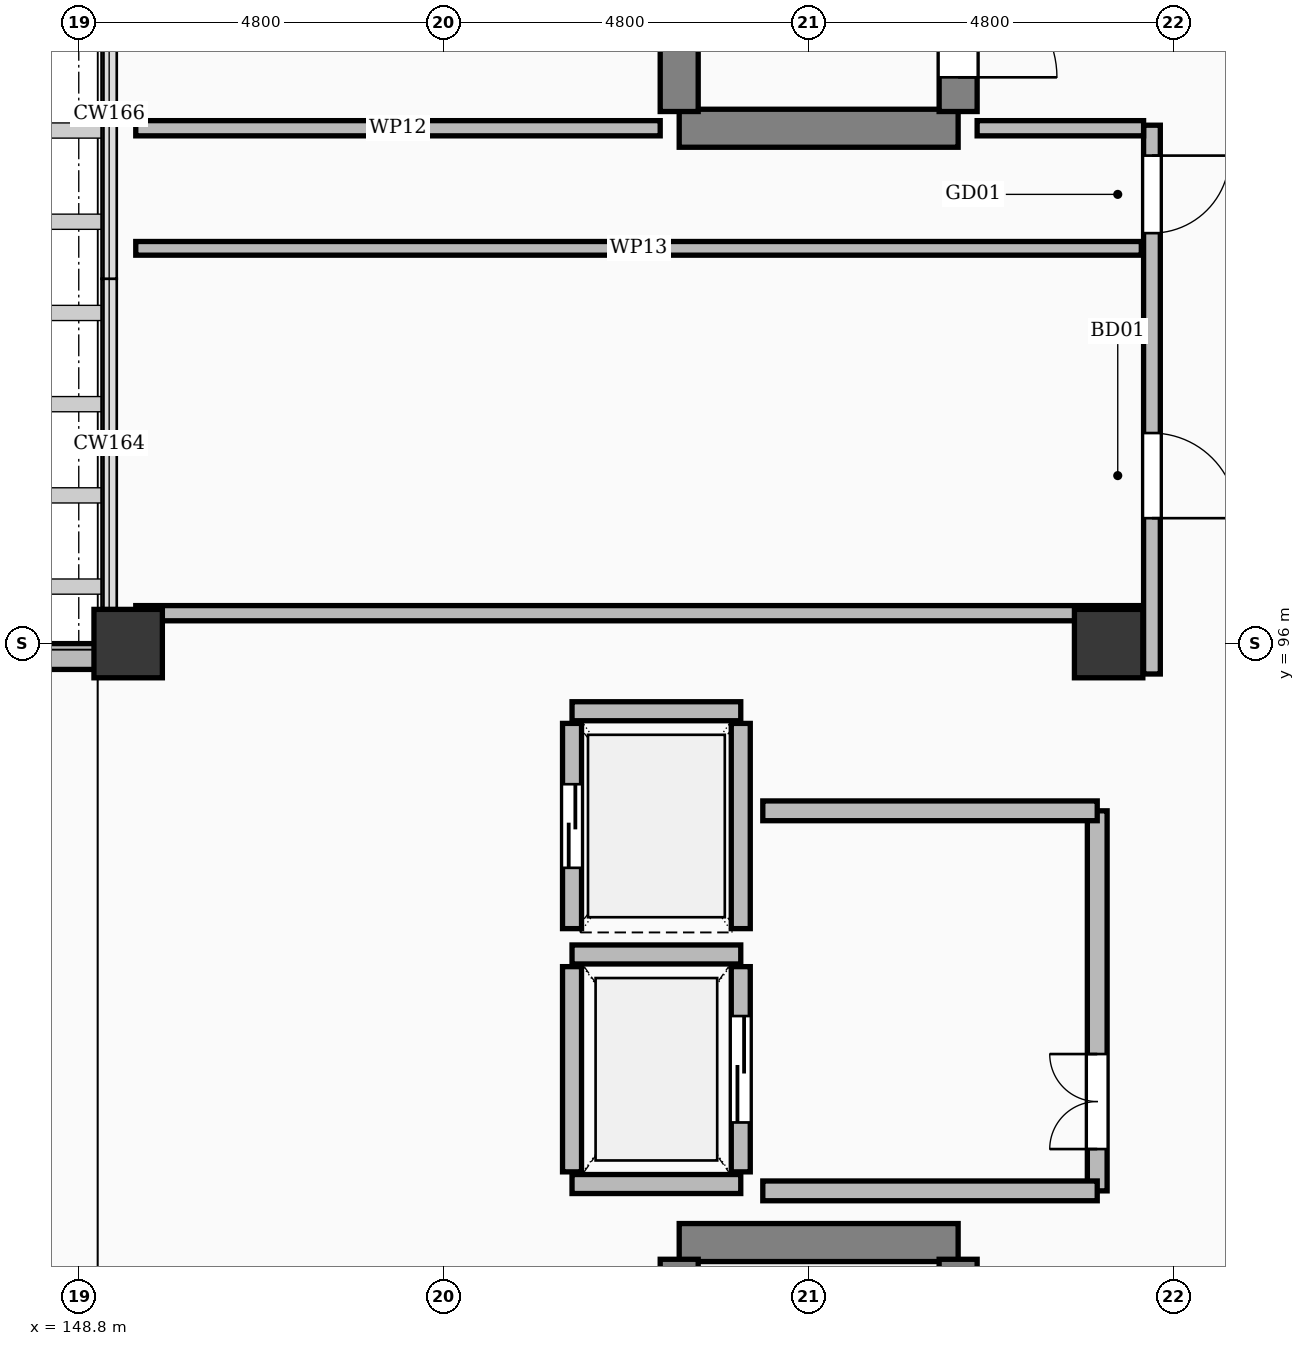
"""IFC4 building model, lengths in metres.
Left out: names, types, materials, properties, quantities, classifications, styles, units other than length and angle.
Written with IfcOpenShell. Run it as: python <this file> out.ifc"""

import sys

from ifc_helpers import new_model, si_unit, direction, frame, frame_2d, origin, origin_2d, place, context, subcontext, project, spatial, rectangle, extrude, element, fill, save


model = new_model("IFC4")
c1 = context("Model", 3, precision=1e-05, world=origin(), true_north=direction((0.0, 1.0)))
c2 = subcontext(c1, "Body", "Model", "MODEL_VIEW")
j1 = project(units=[si_unit("LENGTHUNIT", "METRE"), si_unit("PLANEANGLEUNIT", "RADIAN")], contexts=[c1])
p1 = place(None, origin())
s1 = spatial("IfcSite", under=j1, at=p1, CompositionType="ELEMENT")
p2 = place(p1, origin())
s2 = spatial("IfcBuilding", under=s1, at=p2, CompositionType="ELEMENT")
p3 = place(p2, frame((0.0, 0.0, 16.2)))
s3 = spatial("IfcBuildingStorey", under=s2, at=p3, CompositionType="ELEMENT", Elevation=16.2)
for number, where, z_axis, x_axis in (
    (1, (149.45, 96.0, 0.0), (0.0, 0.0, 1.0), (1.0, 0.0, 0.0)),
    (2, (162.35, 96.0, 0.0), (0.0, 0.0, 1.0), (1.0, 0.0, 0.0)),
):
    element("IfcColumn", number, at=place(p3, frame(where, z_axis=z_axis, x_axis=x_axis)), inside=s3, PredefinedType="COLUMN", context=c2, shape_type="SweptSolid", body=[
        extrude(rectangle(XDim=0.9, YDim=0.9, at=origin_2d()), origin(), (0.0, 0.0, 1.0), 4.8),
    ])
p4 = place(p3, frame((144.3, 95.83, 0.0), z_axis=(0.0, 0.0, 1.0), x_axis=(1.0, 0.0, 0.0)))
e3 = element("IfcWall", 3, at=p4, inside=s3, PredefinedType="SOLIDWALL", context=c2, shape_type="SweptSolid", body=[
    extrude(rectangle(XDim=4.725, YDim=0.34, at=frame_2d((2.362, 0.0))), origin(), (0.0, 0.0, 1.0), 3.032),
])
p5 = place(p3, frame((156.7, 88.12, 0.0), z_axis=(0.0, 0.0, 1.0), x_axis=(1.0, 0.0, 0.0)))
e4 = element("IfcWall", 4, at=p5, inside=s3, PredefinedType="SHEAR", context=c2, shape_type="SweptSolid", body=[
    extrude(rectangle(XDim=3.67, YDim=0.5, at=frame_2d((1.835, 0.0))), origin(), (0.0, 0.0, 1.0), 4.54),
])
p6 = place(p3, frame((156.7, 77.4, 0.0), z_axis=(0.0, 0.0, 1.0), x_axis=(0.0, 1.0, 0.0)))
e5 = element("IfcWall", 5, at=p6, inside=s3, PredefinedType="SHEAR", context=c2, shape_type="SweptSolid", body=[
    extrude(rectangle(XDim=10.5, YDim=0.5, at=frame_2d((5.25, 0.0))), origin(), (0.0, 0.0, 1.0), 4.54),
])
p7 = place(p3, frame((160.37, 77.4, 0.0), z_axis=(0.0, 0.0, 1.0), x_axis=(0.0, 1.0, 0.0)))
e6 = element("IfcWall", 6, at=p7, inside=s3, PredefinedType="SHEAR", context=c2, shape_type="SweptSolid", body=[
    extrude(rectangle(XDim=10.5, YDim=0.5, at=frame_2d((5.25, 0.0))), origin(), (0.0, 0.0, 1.0), 4.54),
])
p8 = place(p7, frame((0.45, 0.0, 0.0)))
e7 = element("IfcOpeningElement", 7, at=p8, cuts=e6, PredefinedType="OPENING", context=c2, shape_type="SweptSolid", body=[
    extrude(rectangle(XDim=1.3, YDim=2.15, at=frame_2d((0.65, 1.075))), frame((0.0, 0.262, 0.0), z_axis=(0.0, -1.0, 0.0), x_axis=(1.0, 0.0, 0.0)), (0.0, 0.0, 1.0), 0.524),
])
for number, where, z_axis, x_axis in (
    (8, (155.29, 88.89, 0.0), (0.0, 0.0, 1.0), (1.0, 0.0, 0.0)),
    (9, (155.29, 91.91, 0.0), (0.0, 0.0, 1.0), (1.0, 0.0, 0.0)),
):
    element("IfcWall", number, at=place(p3, frame(where, z_axis=z_axis, x_axis=x_axis)), inside=s3, PredefinedType="SOLIDWALL", context=c2, shape_type="SweptSolid", body=[
        extrude(rectangle(XDim=2.22, YDim=0.25, at=frame_2d((1.11, 0.0))), origin(), (0.0, 0.0, 1.0), 4.54),
    ])
p9 = place(p3, frame((155.29, 89.05, 0.0), z_axis=(0.0, 0.0, 1.0), x_axis=(0.0, 1.0, 0.0)))
e10 = element("IfcWall", 10, at=p9, inside=s3, PredefinedType="SOLIDWALL", context=c2, shape_type="SweptSolid", body=[
    extrude(rectangle(XDim=2.7, YDim=0.25, at=frame_2d((1.35, 0.0))), origin(), (0.0, 0.0, 1.0), 4.54),
])
p10 = place(p3, frame((157.51, 89.05, 0.0), z_axis=(0.0, 0.0, 1.0), x_axis=(0.0, 1.0, 0.0)))
e11 = element("IfcWall", 11, at=p10, inside=s3, PredefinedType="SOLIDWALL", context=c2, shape_type="SweptSolid", body=[
    extrude(rectangle(XDim=2.7, YDim=0.25, at=frame_2d((1.35, 0.0))), origin(), (0.0, 0.0, 1.0), 4.54),
])
p11 = place(p10, frame((0.65, 0.0, 0.0)))
e12 = element("IfcOpeningElement", 12, at=p11, cuts=e11, PredefinedType="OPENING", context=c2, shape_type="SweptSolid", body=[
    extrude(rectangle(XDim=1.4, YDim=2.3, at=frame_2d((0.7, 1.15))), frame((0.0, 0.137, 0.0), z_axis=(0.0, -1.0, 0.0), x_axis=(1.0, 0.0, 0.0)), (0.0, 0.0, 1.0), 0.274),
])
p12 = place(p3, frame((155.29, 95.11, 0.0), z_axis=(0.0, 0.0, 1.0), x_axis=(1.0, 0.0, 0.0)))
e13 = element("IfcWall", 13, at=p12, inside=s3, PredefinedType="SOLIDWALL", context=c2, shape_type="SweptSolid", body=[
    extrude(rectangle(XDim=2.22, YDim=0.25, at=frame_2d((1.11, 0.0))), origin(), (0.0, 0.0, 1.0), 4.54),
])
p13 = place(p3, frame((155.29, 92.25, 0.0), z_axis=(0.0, 0.0, 1.0), x_axis=(0.0, 1.0, 0.0)))
e14 = element("IfcWall", 14, at=p13, inside=s3, PredefinedType="SOLIDWALL", context=c2, shape_type="SweptSolid", body=[
    extrude(rectangle(XDim=2.7, YDim=0.25, at=frame_2d((1.35, 0.0))), origin(), (0.0, 0.0, 1.0), 4.54),
])
p14 = place(p13, frame((0.8, 0.0, 0.0)))
e15 = element("IfcOpeningElement", 15, at=p14, cuts=e14, PredefinedType="OPENING", context=c2, shape_type="SweptSolid", body=[
    extrude(rectangle(XDim=1.1, YDim=2.2, at=frame_2d((0.55, 1.1))), frame((0.0, 0.137, 0.0), z_axis=(0.0, -1.0, 0.0), x_axis=(1.0, 0.0, 0.0)), (0.0, 0.0, 1.0), 0.274),
])
p15 = place(p3, frame((157.51, 92.25, 0.0), z_axis=(0.0, 0.0, 1.0), x_axis=(0.0, 1.0, 0.0)))
e16 = element("IfcWall", 16, at=p15, inside=s3, PredefinedType="SOLIDWALL", context=c2, shape_type="SweptSolid", body=[
    extrude(rectangle(XDim=2.7, YDim=0.25, at=frame_2d((1.35, 0.0))), origin(), (0.0, 0.0, 1.0), 4.54),
])
p16 = place(p3, frame((162.2, 88.8, 0.0), z_axis=(0.0, 0.0, 1.0), x_axis=(0.0, 1.0, 0.0)))
e17 = element("IfcWall", 17, at=p16, inside=s3, PredefinedType="SOLIDWALL", context=c2, shape_type="SweptSolid", body=[
    extrude(rectangle(XDim=5.0, YDim=0.26, at=frame_2d((2.5, 0.0))), origin(), (0.0, 0.0, 1.0), 3.132),
])
p17 = place(p16, frame((0.55, 0.0, 0.0)))
e18 = element("IfcOpeningElement", 18, at=p17, cuts=e17, PredefinedType="OPENING", context=c2, shape_type="SweptSolid", body=[
    extrude(rectangle(XDim=1.25, YDim=2.15, at=frame_2d((0.625, 1.075))), frame((0.0, 0.142, 0.0), z_axis=(0.0, -1.0, 0.0), x_axis=(1.0, 0.0, 0.0)), (0.0, 0.0, 1.0), 0.284),
])
for number, where, z_axis, x_axis in (
    (19, (157.8, 88.8, 0.0), (0.0, 0.0, 1.0), (1.0, 0.0, 0.0)),
    (20, (157.8, 93.8, 0.0), (0.0, 0.0, 1.0), (1.0, 0.0, 0.0)),
):
    element("IfcWall", number, at=place(p3, frame(where, z_axis=z_axis, x_axis=x_axis)), inside=s3, PredefinedType="SOLIDWALL", context=c2, shape_type="SweptSolid", body=[
        extrude(rectangle(XDim=4.4, YDim=0.26, at=frame_2d((2.2, 0.0))), origin(), (0.0, 0.0, 1.0), 3.132),
    ])
p18 = place(p3, frame((156.7, 102.78, 0.0), z_axis=(0.0, 0.0, 1.0), x_axis=(1.0, 0.0, 0.0)))
e21 = element("IfcWall", 21, at=p18, inside=s3, PredefinedType="SHEAR", context=c2, shape_type="SweptSolid", body=[
    extrude(rectangle(XDim=3.67, YDim=0.5, at=frame_2d((1.835, 0.0))), origin(), (0.0, 0.0, 1.0), 4.54),
])
p19 = place(p3, frame((156.7, 103.0, 0.0), z_axis=(0.0, 0.0, 1.0), x_axis=(0.0, 1.0, 0.0)))
e22 = element("IfcWall", 22, at=p19, inside=s3, PredefinedType="SHEAR", context=c2, shape_type="SweptSolid", body=[
    extrude(rectangle(XDim=10.5, YDim=0.5, at=frame_2d((5.25, 0.0))), origin(), (0.0, 0.0, 1.0), 4.54),
])
p20 = place(p3, frame((160.37, 103.0, 0.0), z_axis=(0.0, 0.0, 1.0), x_axis=(0.0, 1.0, 0.0)))
e23 = element("IfcWall", 23, at=p20, inside=s3, PredefinedType="SHEAR", context=c2, shape_type="SweptSolid", body=[
    extrude(rectangle(XDim=10.5, YDim=0.5, at=frame_2d((5.25, 0.0))), origin(), (0.0, 0.0, 1.0), 4.54),
])
p21 = place(p20, frame((0.45, 0.0, 0.0)))
e24 = element("IfcOpeningElement", 24, at=p21, cuts=e23, PredefinedType="OPENING", context=c2, shape_type="SweptSolid", body=[
    extrude(rectangle(XDim=1.3, YDim=2.15, at=frame_2d((0.65, 1.075))), frame((0.0, 0.262, 0.0), z_axis=(0.0, -1.0, 0.0), x_axis=(1.0, 0.0, 0.0)), (0.0, 0.0, 1.0), 0.524),
])
p22 = place(p3, frame((162.92, 95.6, 0.0), z_axis=(0.0, 0.0, 1.0), x_axis=(0.0, 1.0, 0.0)))
e25 = element("IfcWall", 25, at=p22, inside=s3, PredefinedType="PARTITIONING", context=c2, shape_type="SweptSolid", body=[
    extrude(rectangle(XDim=7.22, YDim=0.22, at=frame_2d((3.61, 0.0))), origin(), (0.0, 0.0, 1.0), 3.732),
])
p23 = place(p22, frame((2.05, 0.0, 0.0)))
e26 = element("IfcOpeningElement", 26, at=p23, cuts=e25, PredefinedType="OPENING", context=c2, shape_type="SweptSolid", body=[
    extrude(rectangle(XDim=1.12, YDim=2.15, at=frame_2d((0.56, 1.075))), frame((0.0, 0.122, 0.0), z_axis=(0.0, -1.0, 0.0), x_axis=(1.0, 0.0, 0.0)), (0.0, 0.0, 1.0), 0.244),
])
p24 = place(p22, frame((5.8, 0.0, 0.0)))
e27 = element("IfcOpeningElement", 27, at=p24, cuts=e25, PredefinedType="OPENING", context=c2, shape_type="SweptSolid", body=[
    extrude(rectangle(XDim=1.02, YDim=2.2, at=frame_2d((0.51, 1.1))), frame((0.0, 0.122, 0.0), z_axis=(0.0, -1.0, 0.0), x_axis=(1.0, 0.0, 0.0)), (0.0, 0.0, 1.0), 0.244),
])
p25 = place(p3, frame((149.55, 96.4, 0.0), z_axis=(0.0, 0.0, 1.0), x_axis=(1.0, 0.0, 0.0)))
e28 = element("IfcWall", 28, at=p25, inside=s3, PredefinedType="PARTITIONING", context=c2, shape_type="SweptSolid", body=[
    extrude(rectangle(XDim=13.23, YDim=0.2, at=frame_2d((6.615, 0.0))), origin(), (0.0, 0.0, 1.0), 3.032),
])
p26 = place(p3, frame((149.55, 101.2, 0.0), z_axis=(0.0, 0.0, 1.0), x_axis=(1.0, 0.0, 0.0)))
e29 = element("IfcWall", 29, at=p26, inside=s3, PredefinedType="PARTITIONING", context=c2, shape_type="SweptSolid", body=[
    extrude(rectangle(XDim=13.23, YDim=0.18, at=frame_2d((6.615, 0.0))), origin(), (0.0, 0.0, 1.0), 3.032),
])
p27 = place(p3, frame((149.55, 102.78, 0.0), z_axis=(0.0, 0.0, 1.0), x_axis=(1.0, 0.0, 0.0)))
e30 = element("IfcWall", 30, at=p27, inside=s3, PredefinedType="PARTITIONING", context=c2, shape_type="SweptSolid", body=[
    extrude(rectangle(XDim=6.9, YDim=0.2, at=frame_2d((3.45, 0.0))), origin(), (0.0, 0.0, 1.0), 3.032),
])
p28 = place(p3, frame((160.62, 102.78, 0.0), z_axis=(0.0, 0.0, 1.0), x_axis=(1.0, 0.0, 0.0)))
e31 = element("IfcWall", 31, at=p28, inside=s3, PredefinedType="PARTITIONING", context=c2, shape_type="SweptSolid", body=[
    extrude(rectangle(XDim=2.19, YDim=0.2, at=frame_2d((1.095, 0.0))), origin(), (0.0, 0.0, 1.0), 3.132),
])
p29 = place(p11, origin())
e32 = element("IfcDoor", 32, at=p29, inside=s3, OperationType="SLIDING_TO_LEFT", PredefinedType="DOOR", context=c2, shape_type="SweptSolid", body=[
    extrude(rectangle(XDim=1.4, YDim=2.3, at=frame_2d((0.7, 1.15))), frame((0.0, 0.025, 0.0), z_axis=(0.0, -1.0, 0.0), x_axis=(1.0, 0.0, 0.0)), (0.0, 0.0, 1.0), 0.05),
])
fill(e12, e32)
p30 = place(p14, origin())
e33 = element("IfcDoor", 33, at=p30, inside=s3, OperationType="SLIDING_TO_LEFT", PredefinedType="DOOR", context=c2, shape_type="SweptSolid", body=[
    extrude(rectangle(XDim=1.1, YDim=2.2, at=frame_2d((0.55, 1.1))), frame((0.0, 0.025, 0.0), z_axis=(0.0, -1.0, 0.0), x_axis=(1.0, 0.0, 0.0)), (0.0, 0.0, 1.0), 0.05),
])
fill(e15, e33)
p31 = place(p17, origin())
e34 = element("IfcDoor", 34, at=p31, inside=s3, OperationType="DOUBLE_DOOR_SINGLE_SWING", PredefinedType="DOOR", context=c2, shape_type="SweptSolid", body=[
    extrude(rectangle(XDim=1.25, YDim=2.15, at=frame_2d((0.625, 1.075))), frame((0.0, 0.025, 0.0), z_axis=(0.0, -1.0, 0.0), x_axis=(1.0, 0.0, 0.0)), (0.0, 0.0, 1.0), 0.05),
])
fill(e18, e34)
p32 = place(p21, frame((1.3, 0.0, 0.0), z_axis=(0.0, 0.0, 1.0), x_axis=(-1.0, 0.0, 0.0)))
e35 = element("IfcDoor", 35, at=p32, inside=s3, OperationType="SINGLE_SWING_LEFT", PredefinedType="DOOR", context=c2, shape_type="SweptSolid", body=[
    extrude(rectangle(XDim=1.3, YDim=2.15, at=frame_2d((0.65, 1.075))), frame((0.0, 0.025, 0.0), z_axis=(0.0, -1.0, 0.0), x_axis=(1.0, 0.0, 0.0)), (0.0, 0.0, 1.0), 0.05),
])
fill(e24, e35)
p33 = place(p23, frame((1.12, 0.0, 0.0), z_axis=(0.0, 0.0, 1.0), x_axis=(-1.0, 0.0, 0.0)))
e36 = element("IfcDoor", 36, at=p33, inside=s3, OperationType="SINGLE_SWING_LEFT", PredefinedType="DOOR", context=c2, shape_type="SweptSolid", body=[
    extrude(rectangle(XDim=1.12, YDim=2.15, at=frame_2d((0.56, 1.075))), frame((0.0, 0.025, 0.0), z_axis=(0.0, -1.0, 0.0), x_axis=(1.0, 0.0, 0.0)), (0.0, 0.0, 1.0), 0.05),
])
fill(e26, e36)
p34 = place(p24, frame((1.02, 0.0, 0.0), z_axis=(0.0, 0.0, 1.0), x_axis=(-1.0, 0.0, 0.0)))
e37 = element("IfcDoor", 37, at=p34, inside=s3, OperationType="SINGLE_SWING_RIGHT", PredefinedType="DOOR", context=c2, shape_type="SweptSolid", body=[
    extrude(rectangle(XDim=1.02, YDim=2.2, at=frame_2d((0.51, 1.1))), frame((0.0, 0.025, 0.0), z_axis=(0.0, -1.0, 0.0), x_axis=(1.0, 0.0, 0.0)), (0.0, 0.0, 1.0), 0.05),
])
fill(e27, e37)
save(model, sys.argv[1])
